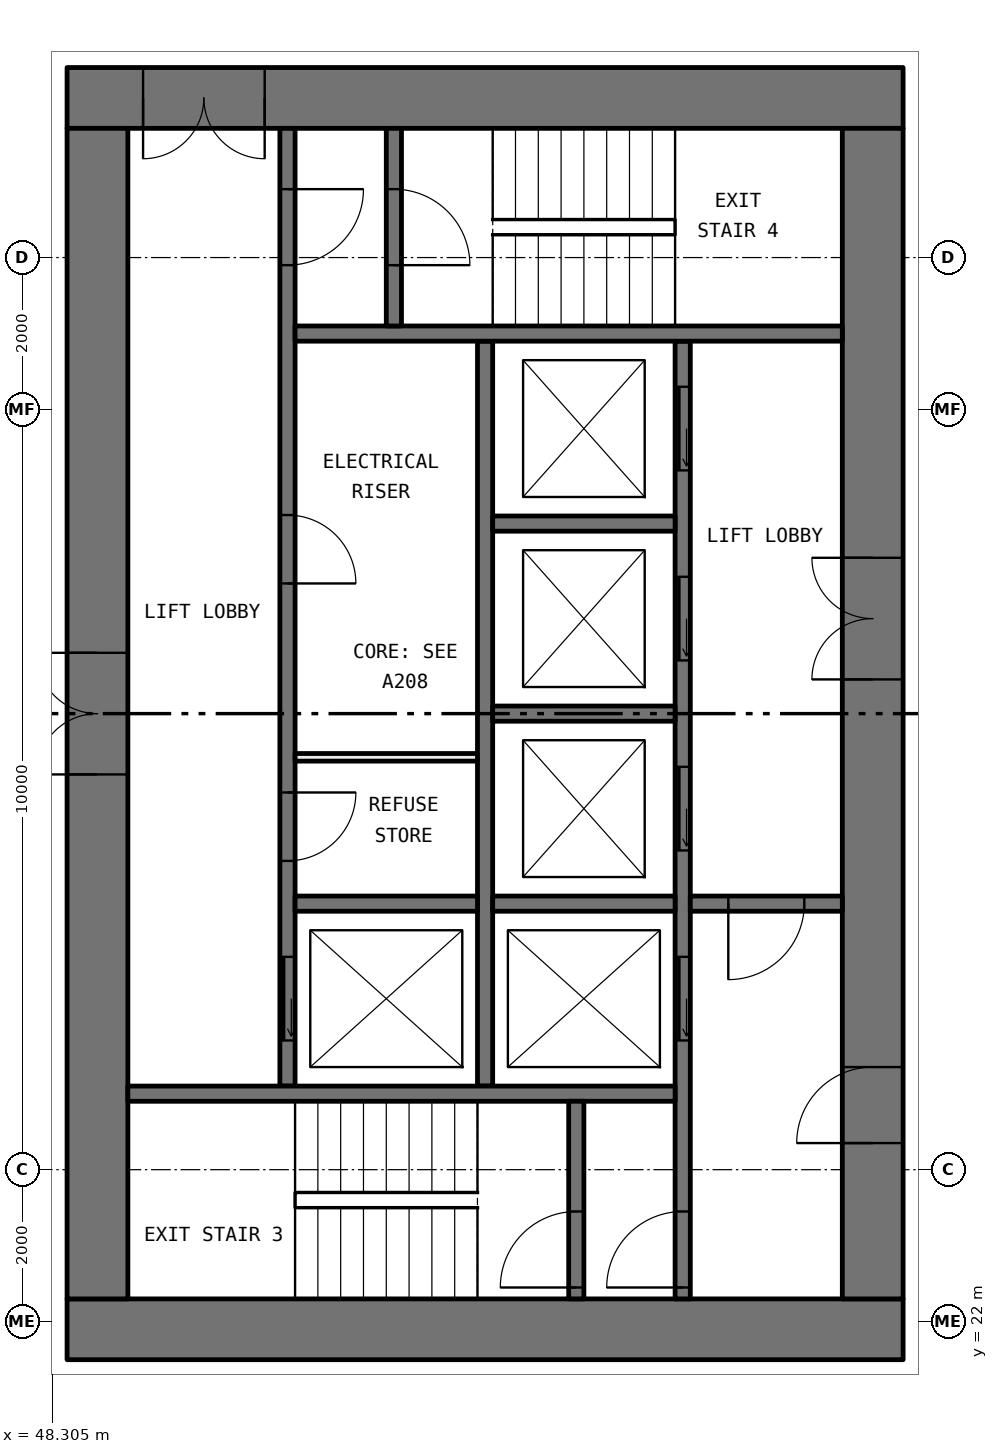
"""IFC4 building model, lengths in metres.
Left out: names, types, materials, properties, quantities, classifications, styles, units other than length and angle.
Written with IfcOpenShell. Run it as: python <this file> out.ifc"""

import sys

from ifc_helpers import new_model, si_unit, direction, frame, frame_2d, origin, place, context, subcontext, project, spatial, rectangle, extrude, element, fill, save


model = new_model("IFC4")
c1 = context("Model", 3, precision=1e-05, world=origin(), true_north=direction((0.0, 1.0)))
c2 = subcontext(c1, "Body", "Model", "MODEL_VIEW")
j1 = project(units=[si_unit("LENGTHUNIT", "METRE"), si_unit("PLANEANGLEUNIT", "RADIAN")], contexts=[c1])
p1 = place(None, origin())
s1 = spatial("IfcSite", under=j1, at=p1, CompositionType="ELEMENT")
p2 = place(p1, origin())
s2 = spatial("IfcBuilding", under=s1, at=p2, CompositionType="ELEMENT")
p3 = place(p2, frame((0.0, 0.0, 36.9)))
s3 = spatial("IfcBuildingStorey", under=s2, at=p3, CompositionType="ELEMENT", Elevation=36.9)
p4 = place(p3, frame((59.5, 21.9, 0.0), z_axis=(0.0, 0.0, 1.0), x_axis=(-1.0, 0.0, 0.0)))
e1 = element("IfcWall", 1, at=p4, inside=s3, PredefinedType="SHEAR", context=c2, shape_type="SweptSolid", body=[
    extrude(rectangle(XDim=11.0, YDim=0.8, at=frame_2d((5.5, 0.0))), origin(), (0.0, 0.0, 1.0), 3.05),
])
p5 = place(p3, frame((59.5, 38.1, 0.0), z_axis=(0.0, 0.0, 1.0), x_axis=(-1.0, 0.0, 0.0)))
e2 = element("IfcWall", 2, at=p5, inside=s3, PredefinedType="SHEAR", context=c2, shape_type="SweptSolid", body=[
    extrude(rectangle(XDim=11.0, YDim=0.8, at=frame_2d((5.5, 0.0))), origin(), (0.0, 0.0, 1.0), 3.05),
])
p6 = place(p5, frame((8.4, 0.0, 0.0)))
e3 = element("IfcOpeningElement", 3, at=p6, cuts=e2, PredefinedType="OPENING", context=c2, shape_type="SweptSolid", body=[
    extrude(rectangle(XDim=1.6, YDim=2.1, at=frame_2d((0.8, 1.05))), frame((0.0, 0.41, 0.0), z_axis=(0.0, -1.0, 0.0), x_axis=(1.0, 0.0, 0.0)), (0.0, 0.0, 1.0), 0.82),
])
p7 = place(p3, frame((59.1, 22.3, 0.0), z_axis=(0.0, 0.0, 1.0), x_axis=(0.0, 1.0, 0.0)))
e4 = element("IfcWall", 4, at=p7, inside=s3, PredefinedType="SHEAR", context=c2, shape_type="SweptSolid", body=[
    extrude(rectangle(XDim=15.4, YDim=0.8, at=frame_2d((7.7, 0.0))), origin(), (0.0, 0.0, 1.0), 3.05),
])
p8 = place(p7, frame((8.15, 0.0, 0.0)))
e5 = element("IfcOpeningElement", 5, at=p8, cuts=e4, PredefinedType="OPENING", context=c2, shape_type="SweptSolid", body=[
    extrude(rectangle(XDim=1.6, YDim=2.1, at=frame_2d((0.8, 1.05))), frame((0.0, 0.41, 0.0), z_axis=(0.0, -1.0, 0.0), x_axis=(1.0, 0.0, 0.0)), (0.0, 0.0, 1.0), 0.82),
])
p9 = place(p7, frame((2.05, 0.0, 0.0)))
e6 = element("IfcOpeningElement", 6, at=p9, cuts=e4, PredefinedType="OPENING", context=c2, shape_type="SweptSolid", body=[
    extrude(rectangle(XDim=1.0, YDim=2.1, at=frame_2d((0.5, 1.05))), frame((0.0, 0.41, 0.0), z_axis=(0.0, -1.0, 0.0), x_axis=(1.0, 0.0, 0.0)), (0.0, 0.0, 1.0), 0.82),
])
p10 = place(p3, frame((48.9, 22.3, 0.0), z_axis=(0.0, 0.0, 1.0), x_axis=(0.0, 1.0, 0.0)))
e7 = element("IfcWall", 7, at=p10, inside=s3, PredefinedType="SHEAR", context=c2, shape_type="SweptSolid", body=[
    extrude(rectangle(XDim=15.4, YDim=0.8, at=frame_2d((7.7, 0.0))), origin(), (0.0, 0.0, 1.0), 3.05),
])
p11 = place(p10, frame((6.9, 0.0, 0.0)))
e8 = element("IfcOpeningElement", 8, at=p11, cuts=e7, PredefinedType="OPENING", context=c2, shape_type="SweptSolid", body=[
    extrude(rectangle(XDim=1.6, YDim=2.1, at=frame_2d((0.8, 1.05))), frame((0.0, 0.41, 0.0), z_axis=(0.0, -1.0, 0.0), x_axis=(1.0, 0.0, 0.0)), (0.0, 0.0, 1.0), 0.82),
])
p12 = place(p3, frame((56.6, 22.3, 0.0), z_axis=(0.0, 0.0, 1.0), x_axis=(0.0, 1.0, 0.0)))
e9 = element("IfcWall", 9, at=p12, inside=s3, PredefinedType="SOLIDWALL", context=c2, shape_type="SweptSolid", body=[
    extrude(rectangle(XDim=12.6, YDim=0.2, at=frame_2d((6.3, 0.0))), origin(), (0.0, 0.0, 1.0), 3.05),
])
p13 = place(p12, frame((3.4, 0.0, 0.0)))
e10 = element("IfcOpeningElement", 10, at=p13, cuts=e9, PredefinedType="OPENING", context=c2, shape_type="SweptSolid", body=[
    extrude(rectangle(XDim=1.1, YDim=2.1, at=frame_2d((0.55, 1.05))), frame((0.0, 0.11, 0.0), z_axis=(0.0, -1.0, 0.0), x_axis=(1.0, 0.0, 0.0)), (0.0, 0.0, 1.0), 0.22),
])
p14 = place(p12, frame((5.9, 0.0, 0.0)))
e11 = element("IfcOpeningElement", 11, at=p14, cuts=e9, PredefinedType="OPENING", context=c2, shape_type="SweptSolid", body=[
    extrude(rectangle(XDim=1.1, YDim=2.1, at=frame_2d((0.55, 1.05))), frame((0.0, 0.11, 0.0), z_axis=(0.0, -1.0, 0.0), x_axis=(1.0, 0.0, 0.0)), (0.0, 0.0, 1.0), 0.22),
])
p15 = place(p12, frame((8.4, 0.0, 0.0)))
e12 = element("IfcOpeningElement", 12, at=p15, cuts=e9, PredefinedType="OPENING", context=c2, shape_type="SweptSolid", body=[
    extrude(rectangle(XDim=1.1, YDim=2.1, at=frame_2d((0.55, 1.05))), frame((0.0, 0.11, 0.0), z_axis=(0.0, -1.0, 0.0), x_axis=(1.0, 0.0, 0.0)), (0.0, 0.0, 1.0), 0.22),
])
p16 = place(p12, frame((10.9, 0.0, 0.0)))
e13 = element("IfcOpeningElement", 13, at=p16, cuts=e9, PredefinedType="OPENING", context=c2, shape_type="SweptSolid", body=[
    extrude(rectangle(XDim=1.1, YDim=2.1, at=frame_2d((0.55, 1.05))), frame((0.0, 0.11, 0.0), z_axis=(0.0, -1.0, 0.0), x_axis=(1.0, 0.0, 0.0)), (0.0, 0.0, 1.0), 0.22),
])
p17 = place(p12, frame((0.15, 0.0, 0.0)))
e14 = element("IfcOpeningElement", 14, at=p17, cuts=e9, PredefinedType="OPENING", context=c2, shape_type="SweptSolid", body=[
    extrude(rectangle(XDim=1.0, YDim=2.1, at=frame_2d((0.5, 1.05))), frame((0.0, 0.11, 0.0), z_axis=(0.0, -1.0, 0.0), x_axis=(1.0, 0.0, 0.0)), (0.0, 0.0, 1.0), 0.22),
])
p18 = place(p3, frame((51.4, 25.1, 0.0), z_axis=(0.0, 0.0, 1.0), x_axis=(0.0, 1.0, 0.0)))
e15 = element("IfcWall", 15, at=p18, inside=s3, PredefinedType="SOLIDWALL", context=c2, shape_type="SweptSolid", body=[
    extrude(rectangle(XDim=12.6, YDim=0.2, at=frame_2d((6.3, 0.0))), origin(), (0.0, 0.0, 1.0), 3.05),
])
p19 = place(p18, frame((0.6, 0.0, 0.0)))
e16 = element("IfcOpeningElement", 16, at=p19, cuts=e15, PredefinedType="OPENING", context=c2, shape_type="SweptSolid", body=[
    extrude(rectangle(XDim=1.1, YDim=2.1, at=frame_2d((0.55, 1.05))), frame((0.0, 0.11, 0.0), z_axis=(0.0, -1.0, 0.0), x_axis=(1.0, 0.0, 0.0)), (0.0, 0.0, 1.0), 0.22),
])
p20 = place(p18, frame((10.8, 0.0, 0.0)))
e17 = element("IfcOpeningElement", 17, at=p20, cuts=e15, PredefinedType="OPENING", context=c2, shape_type="SweptSolid", body=[
    extrude(rectangle(XDim=1.0, YDim=2.1, at=frame_2d((0.5, 1.05))), frame((0.0, 0.11, 0.0), z_axis=(0.0, -1.0, 0.0), x_axis=(1.0, 0.0, 0.0)), (0.0, 0.0, 1.0), 0.22),
])
p21 = place(p18, frame((2.962, 0.0, 0.0)))
e18 = element("IfcOpeningElement", 18, at=p21, cuts=e15, PredefinedType="OPENING", context=c2, shape_type="SweptSolid", body=[
    extrude(rectangle(XDim=0.9, YDim=2.1, at=frame_2d((0.45, 1.05))), frame((0.0, 0.11, 0.0), z_axis=(0.0, -1.0, 0.0), x_axis=(1.0, 0.0, 0.0)), (0.0, 0.0, 1.0), 0.22),
])
p22 = place(p18, frame((6.613, 0.0, 0.0)))
e19 = element("IfcOpeningElement", 19, at=p22, cuts=e15, PredefinedType="OPENING", context=c2, shape_type="SweptSolid", body=[
    extrude(rectangle(XDim=0.9, YDim=2.1, at=frame_2d((0.45, 1.05))), frame((0.0, 0.11, 0.0), z_axis=(0.0, -1.0, 0.0), x_axis=(1.0, 0.0, 0.0)), (0.0, 0.0, 1.0), 0.22),
])
p23 = place(p3, frame((54.0, 25.1, 0.0), z_axis=(0.0, 0.0, 1.0), x_axis=(0.0, 1.0, 0.0)))
e20 = element("IfcWall", 20, at=p23, inside=s3, PredefinedType="SOLIDWALL", context=c2, shape_type="SweptSolid", body=[
    extrude(rectangle(XDim=9.8, YDim=0.2, at=frame_2d((4.9, 0.0))), origin(), (0.0, 0.0, 1.0), 3.05),
])
for number, where, z_axis, x_axis in (
    (21, (56.5, 25.0, 0.0), (0.0, 0.0, 1.0), (-1.0, 0.0, 0.0)),
    (22, (58.7, 35.0, 0.0), (0.0, 0.0, 1.0), (-1.0, 0.0, 0.0)),
):
    element("IfcWall", number, at=place(p3, frame(where, z_axis=z_axis, x_axis=x_axis)), inside=s3, PredefinedType="SOLIDWALL", context=c2, shape_type="SweptSolid", body=[
        extrude(rectangle(XDim=7.2, YDim=0.2, at=frame_2d((3.6, 0.0))), origin(), (0.0, 0.0, 1.0), 3.05),
    ])
p24 = place(p3, frame((58.7, 27.5, 0.0), z_axis=(0.0, 0.0, 1.0), x_axis=(-1.0, 0.0, 0.0)))
e23 = element("IfcWall", 23, at=p24, inside=s3, PredefinedType="SOLIDWALL", context=c2, shape_type="SweptSolid", body=[
    extrude(rectangle(XDim=2.0, YDim=0.2, at=frame_2d((1.0, 0.0))), origin(), (0.0, 0.0, 1.0), 3.05),
])
p25 = place(p24, frame((0.5, 0.0, 0.0)))
e24 = element("IfcOpeningElement", 24, at=p25, cuts=e23, PredefinedType="OPENING", context=c2, shape_type="SweptSolid", body=[
    extrude(rectangle(XDim=1.0, YDim=2.1, at=frame_2d((0.5, 1.05))), frame((0.0, 0.11, 0.0), z_axis=(0.0, -1.0, 0.0), x_axis=(1.0, 0.0, 0.0)), (0.0, 0.0, 1.0), 0.22),
])
p26 = place(p3, frame((55.2, 22.3, 0.0), z_axis=(0.0, 0.0, 1.0), x_axis=(0.0, 1.0, 0.0)))
e25 = element("IfcWall", 25, at=p26, inside=s3, PredefinedType="SOLIDWALL", context=c2, shape_type="SweptSolid", body=[
    extrude(rectangle(XDim=2.6, YDim=0.2, at=frame_2d((1.3, 0.0))), origin(), (0.0, 0.0, 1.0), 3.05),
])
p27 = place(p26, frame((0.15, 0.0, 0.0)))
e26 = element("IfcOpeningElement", 26, at=p27, cuts=e25, PredefinedType="OPENING", context=c2, shape_type="SweptSolid", body=[
    extrude(rectangle(XDim=1.0, YDim=2.1, at=frame_2d((0.5, 1.05))), frame((0.0, 0.11, 0.0), z_axis=(0.0, -1.0, 0.0), x_axis=(1.0, 0.0, 0.0)), (0.0, 0.0, 1.0), 0.22),
])
p28 = place(p3, frame((52.8, 35.1, 0.0), z_axis=(0.0, 0.0, 1.0), x_axis=(0.0, 1.0, 0.0)))
e27 = element("IfcWall", 27, at=p28, inside=s3, PredefinedType="SOLIDWALL", context=c2, shape_type="SweptSolid", body=[
    extrude(rectangle(XDim=2.6, YDim=0.2, at=frame_2d((1.3, 0.0))), origin(), (0.0, 0.0, 1.0), 3.05),
])
p29 = place(p28, frame((0.8, 0.0, 0.0)))
e28 = element("IfcOpeningElement", 28, at=p29, cuts=e27, PredefinedType="OPENING", context=c2, shape_type="SweptSolid", body=[
    extrude(rectangle(XDim=1.0, YDim=2.1, at=frame_2d((0.5, 1.05))), frame((0.0, 0.11, 0.0), z_axis=(0.0, -1.0, 0.0), x_axis=(1.0, 0.0, 0.0)), (0.0, 0.0, 1.0), 0.22),
])
for number, where, z_axis, x_axis in (
    (29, (56.5, 27.5, 0.0), (0.0, 0.0, 1.0), (-1.0, 0.0, 0.0)),
    (30, (56.5, 30.0, 0.0), (0.0, 0.0, 1.0), (-1.0, 0.0, 0.0)),
    (31, (56.5, 32.5, 0.0), (0.0, 0.0, 1.0), (-1.0, 0.0, 0.0)),
    (32, (53.9, 27.5, 0.0), (0.0, 0.0, 1.0), (-1.0, 0.0, 0.0)),
):
    element("IfcWall", number, at=place(p3, frame(where, z_axis=z_axis, x_axis=x_axis)), inside=s3, PredefinedType="SOLIDWALL", context=c2, shape_type="SweptSolid", body=[
        extrude(rectangle(XDim=2.4, YDim=0.2, at=frame_2d((1.2, 0.0))), origin(), (0.0, 0.0, 1.0), 3.05),
    ])
p30 = place(p3, frame((53.9, 29.425, 0.0), z_axis=(0.0, 0.0, 1.0), x_axis=(-1.0, 0.0, 0.0)))
e33 = element("IfcWall", 33, at=p30, inside=s3, PredefinedType="PARTITIONING", context=c2, shape_type="SweptSolid", body=[
    extrude(rectangle(XDim=2.4, YDim=0.1, at=frame_2d((1.2, 0.0))), origin(), (0.0, 0.0, 1.0), 3.05),
])
p31 = place(p19, origin())
e34 = element("IfcDoor", 34, at=p31, inside=s3, OperationType="SLIDING_TO_LEFT", PredefinedType="DOOR", context=c2, shape_type="SweptSolid", body=[
    extrude(rectangle(XDim=1.1, YDim=2.1, at=frame_2d((0.55, 1.05))), frame((0.0, 0.025, 0.0), z_axis=(0.0, -1.0, 0.0), x_axis=(1.0, 0.0, 0.0)), (0.0, 0.0, 1.0), 0.05),
])
fill(e16, e34)
p32 = place(p13, origin())
e35 = element("IfcDoor", 35, at=p32, inside=s3, OperationType="SLIDING_TO_LEFT", PredefinedType="DOOR", context=c2, shape_type="SweptSolid", body=[
    extrude(rectangle(XDim=1.1, YDim=2.1, at=frame_2d((0.55, 1.05))), frame((0.0, 0.025, 0.0), z_axis=(0.0, -1.0, 0.0), x_axis=(1.0, 0.0, 0.0)), (0.0, 0.0, 1.0), 0.05),
])
fill(e10, e35)
p33 = place(p14, origin())
e36 = element("IfcDoor", 36, at=p33, inside=s3, OperationType="SLIDING_TO_LEFT", PredefinedType="DOOR", context=c2, shape_type="SweptSolid", body=[
    extrude(rectangle(XDim=1.1, YDim=2.1, at=frame_2d((0.55, 1.05))), frame((0.0, 0.025, 0.0), z_axis=(0.0, -1.0, 0.0), x_axis=(1.0, 0.0, 0.0)), (0.0, 0.0, 1.0), 0.05),
])
fill(e11, e36)
p34 = place(p15, origin())
e37 = element("IfcDoor", 37, at=p34, inside=s3, OperationType="SLIDING_TO_LEFT", PredefinedType="DOOR", context=c2, shape_type="SweptSolid", body=[
    extrude(rectangle(XDim=1.1, YDim=2.1, at=frame_2d((0.55, 1.05))), frame((0.0, 0.025, 0.0), z_axis=(0.0, -1.0, 0.0), x_axis=(1.0, 0.0, 0.0)), (0.0, 0.0, 1.0), 0.05),
])
fill(e12, e37)
p35 = place(p16, origin())
e38 = element("IfcDoor", 38, at=p35, inside=s3, OperationType="SLIDING_TO_LEFT", PredefinedType="DOOR", context=c2, shape_type="SweptSolid", body=[
    extrude(rectangle(XDim=1.1, YDim=2.1, at=frame_2d((0.55, 1.05))), frame((0.0, 0.025, 0.0), z_axis=(0.0, -1.0, 0.0), x_axis=(1.0, 0.0, 0.0)), (0.0, 0.0, 1.0), 0.05),
])
fill(e13, e38)
p36 = place(p27, origin())
e39 = element("IfcDoor", 39, at=p36, inside=s3, OperationType="SINGLE_SWING_RIGHT", PredefinedType="DOOR", context=c2, shape_type="SweptSolid", body=[
    extrude(rectangle(XDim=1.0, YDim=2.1, at=frame_2d((0.5, 1.05))), frame((0.0, 0.025, 0.0), z_axis=(0.0, -1.0, 0.0), x_axis=(1.0, 0.0, 0.0)), (0.0, 0.0, 1.0), 0.05),
])
fill(e26, e39)
p37 = place(p17, origin())
e40 = element("IfcDoor", 40, at=p37, inside=s3, OperationType="SINGLE_SWING_RIGHT", PredefinedType="DOOR", context=c2, shape_type="SweptSolid", body=[
    extrude(rectangle(XDim=1.0, YDim=2.1, at=frame_2d((0.5, 1.05))), frame((0.0, 0.025, 0.0), z_axis=(0.0, -1.0, 0.0), x_axis=(1.0, 0.0, 0.0)), (0.0, 0.0, 1.0), 0.05),
])
fill(e14, e40)
p38 = place(p20, frame((1.0, 0.0, 0.0), x_axis=(-1.0, 0.0, 0.0)))
e41 = element("IfcDoor", 41, at=p38, inside=s3, OperationType="SINGLE_SWING_RIGHT", PredefinedType="DOOR", context=c2, shape_type="SweptSolid", body=[
    extrude(rectangle(XDim=1.0, YDim=2.1, at=frame_2d((0.5, 1.05))), frame((0.0, 0.025, 0.0), z_axis=(0.0, -1.0, 0.0), x_axis=(1.0, 0.0, 0.0)), (0.0, 0.0, 1.0), 0.05),
])
fill(e17, e41)
p39 = place(p29, frame((1.0, 0.0, 0.0), x_axis=(-1.0, 0.0, 0.0)))
e42 = element("IfcDoor", 42, at=p39, inside=s3, OperationType="SINGLE_SWING_LEFT", PredefinedType="DOOR", context=c2, shape_type="SweptSolid", body=[
    extrude(rectangle(XDim=1.0, YDim=2.1, at=frame_2d((0.5, 1.05))), frame((0.0, 0.025, 0.0), z_axis=(0.0, -1.0, 0.0), x_axis=(1.0, 0.0, 0.0)), (0.0, 0.0, 1.0), 0.05),
])
fill(e28, e42)
p40 = place(p25, origin())
e43 = element("IfcDoor", 43, at=p40, inside=s3, OperationType="SINGLE_SWING_LEFT", PredefinedType="DOOR", context=c2, shape_type="SweptSolid", body=[
    extrude(rectangle(XDim=1.0, YDim=2.1, at=frame_2d((0.5, 1.05))), frame((0.0, 0.025, 0.0), z_axis=(0.0, -1.0, 0.0), x_axis=(1.0, 0.0, 0.0)), (0.0, 0.0, 1.0), 0.05),
])
fill(e24, e43)
p41 = place(p8, origin())
e44 = element("IfcDoor", 44, at=p41, inside=s3, OperationType="DOUBLE_DOOR_SINGLE_SWING", PredefinedType="DOOR", context=c2, shape_type="SweptSolid", body=[
    extrude(rectangle(XDim=1.6, YDim=2.1, at=frame_2d((0.8, 1.05))), frame((0.0, 0.025, 0.0), z_axis=(0.0, -1.0, 0.0), x_axis=(1.0, 0.0, 0.0)), (0.0, 0.0, 1.0), 0.05),
])
fill(e5, e44)
p42 = place(p9, origin())
e45 = element("IfcDoor", 45, at=p42, inside=s3, OperationType="SINGLE_SWING_RIGHT", PredefinedType="DOOR", context=c2, shape_type="SweptSolid", body=[
    extrude(rectangle(XDim=1.0, YDim=2.1, at=frame_2d((0.5, 1.05))), frame((0.0, 0.025, 0.0), z_axis=(0.0, -1.0, 0.0), x_axis=(1.0, 0.0, 0.0)), (0.0, 0.0, 1.0), 0.05),
])
fill(e6, e45)
p43 = place(p6, origin())
e46 = element("IfcDoor", 46, at=p43, inside=s3, OperationType="DOUBLE_DOOR_SINGLE_SWING", PredefinedType="DOOR", context=c2, shape_type="SweptSolid", body=[
    extrude(rectangle(XDim=1.6, YDim=2.1, at=frame_2d((0.8, 1.05))), frame((0.0, 0.025, 0.0), z_axis=(0.0, -1.0, 0.0), x_axis=(1.0, 0.0, 0.0)), (0.0, 0.0, 1.0), 0.05),
])
fill(e3, e46)
p44 = place(p11, origin())
e47 = element("IfcDoor", 47, at=p44, inside=s3, OperationType="DOUBLE_DOOR_SINGLE_SWING", PredefinedType="DOOR", context=c2, shape_type="SweptSolid", body=[
    extrude(rectangle(XDim=1.6, YDim=2.1, at=frame_2d((0.8, 1.05))), frame((0.0, 0.025, 0.0), z_axis=(0.0, -1.0, 0.0), x_axis=(1.0, 0.0, 0.0)), (0.0, 0.0, 1.0), 0.05),
])
fill(e8, e47)
p45 = place(p21, frame((0.9, 0.0, 0.0), x_axis=(-1.0, 0.0, 0.0)))
e48 = element("IfcDoor", 48, at=p45, inside=s3, OperationType="SINGLE_SWING_RIGHT", PredefinedType="DOOR", context=c2, shape_type="SweptSolid", body=[
    extrude(rectangle(XDim=0.9, YDim=2.1, at=frame_2d((0.45, 1.05))), frame((0.0, 0.025, 0.0), z_axis=(0.0, -1.0, 0.0), x_axis=(1.0, 0.0, 0.0)), (0.0, 0.0, 1.0), 0.05),
])
fill(e18, e48)
p46 = place(p22, frame((0.9, 0.0, 0.0), x_axis=(-1.0, 0.0, 0.0)))
e49 = element("IfcDoor", 49, at=p46, inside=s3, OperationType="SINGLE_SWING_LEFT", PredefinedType="DOOR", context=c2, shape_type="SweptSolid", body=[
    extrude(rectangle(XDim=0.9, YDim=2.1, at=frame_2d((0.45, 1.05))), frame((0.0, 0.025, 0.0), z_axis=(0.0, -1.0, 0.0), x_axis=(1.0, 0.0, 0.0)), (0.0, 0.0, 1.0), 0.05),
])
fill(e19, e49)
save(model, sys.argv[1])
